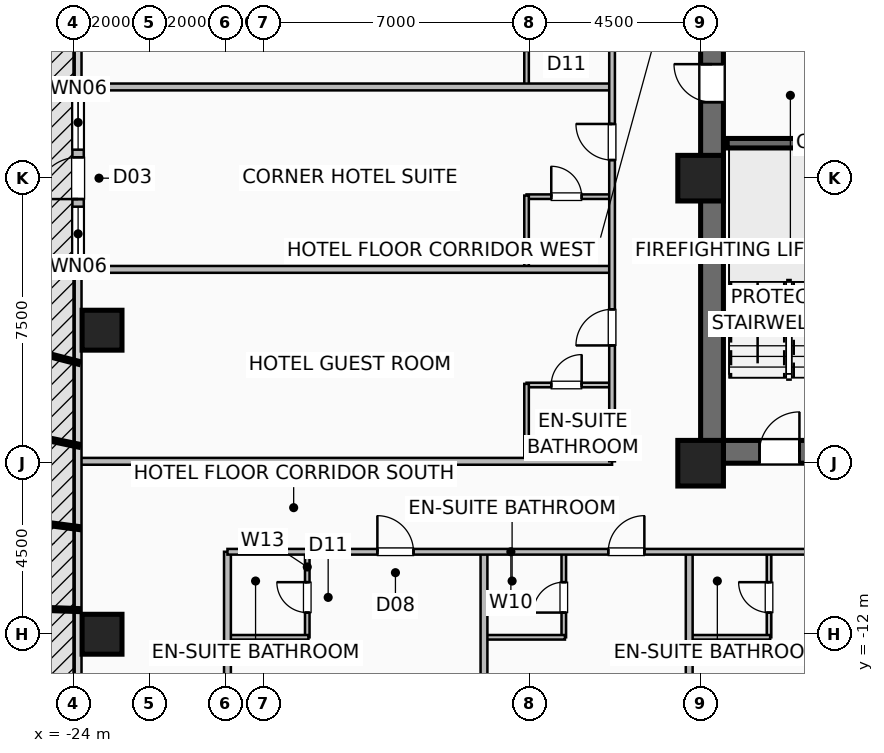
"""IFC4 building model, lengths in metres.
Left out: names, types, materials, properties, quantities, classifications, styles, units other than length and angle.
Written with IfcOpenShell. Run it as: python <this file> out.ifc"""

import sys

from ifc_helpers import new_model, si_unit, direction, frame, frame_2d, origin, origin_2d, place, context, subcontext, project, spatial, rectangle, hollow_rectangle, extrude, element, fill, save


model = new_model("IFC4")
c1 = context("Model", 3, precision=1e-05, world=origin(), true_north=direction((0.0, 1.0)))
c2 = subcontext(c1, "Body", "Model", "MODEL_VIEW")
j1 = project(units=[si_unit("LENGTHUNIT", "METRE"), si_unit("PLANEANGLEUNIT", "RADIAN")], contexts=[c1])
p1 = place(None, origin())
s1 = spatial("IfcSite", under=j1, at=p1, CompositionType="ELEMENT")
p2 = place(p1, origin())
s2 = spatial("IfcBuilding", under=s1, at=p2, CompositionType="ELEMENT")
p3 = place(p2, frame((0.0, 0.0, 27.0)))
s3 = spatial("IfcBuildingStorey", under=s2, at=p3, CompositionType="ELEMENT", Elevation=27.0)
for number, where, z_axis, x_axis in (
    (1, (-7.5, -7.5, 0.0), (0.0, 0.0, 1.0), (1.0, 0.0, 0.0)),
    (2, (-7.5, 0.0, 0.0), (0.0, 0.0, 1.0), (1.0, 0.0, 0.0)),
):
    element("IfcColumn", number, at=place(p3, frame(where, z_axis=z_axis, x_axis=x_axis)), inside=s3, PredefinedType="COLUMN", context=c2, shape_type="SweptSolid", body=[
        extrude(hollow_rectangle(XDim=1.2, YDim=1.2, WallThickness=0.055, at=origin_2d()), origin(), (0.0, 0.0, 1.0), 3.5),
    ])
p4 = place(p3, frame((-23.25, -12.0, -0.4), z_axis=(0.0, 0.0, 1.0), x_axis=(1.0, 0.0, 0.0)))
e3 = element("IfcColumn", 3, at=p4, inside=s3, PredefinedType="COLUMN", context=c2, shape_type="SweptSolid", body=[
    extrude(hollow_rectangle(XDim=1.05, YDim=1.05, WallThickness=0.05, at=origin_2d()), origin(), (0.0, 0.0, 1.0), 3.9),
])
p5 = place(p3, frame((-23.25, -4.0, 0.0), z_axis=(0.0, 0.0, 1.0), x_axis=(1.0, 0.0, 0.0)))
e4 = element("IfcColumn", 4, at=p5, inside=s3, PredefinedType="COLUMN", context=c2, shape_type="SweptSolid", body=[
    extrude(hollow_rectangle(XDim=1.05, YDim=1.05, WallThickness=0.05, at=origin_2d()), origin(), (0.0, 0.0, 1.0), 3.5),
])
p6 = place(p3, frame((-23.88, -2.4, 0.0), z_axis=(0.0, 0.0, 1.0), x_axis=(0.0, 1.0, 0.0)))
e5 = element("IfcWall", 5, at=p6, inside=s3, PredefinedType="SOLIDWALL", context=c2, shape_type="SweptSolid", body=[
    extrude(rectangle(XDim=4.8, YDim=0.3, at=frame_2d((2.4, 0.0))), origin(), (0.0, 0.0, 1.0), 3.25),
])
p7 = place(p6, frame((1.85, 0.0, 0.0)))
e6 = element("IfcOpeningElement", 6, at=p7, cuts=e5, PredefinedType="OPENING", context=c2, shape_type="SweptSolid", body=[
    extrude(rectangle(XDim=1.1, YDim=2.2, at=frame_2d((0.55, 1.1))), frame((0.0, 0.16, 0.0), z_axis=(0.0, -1.0, 0.0), x_axis=(1.0, 0.0, 0.0)), (0.0, 0.0, 1.0), 0.32),
])
p8 = place(p6, frame((0.22, 0.0, 0.85)))
e7 = element("IfcOpeningElement", 7, at=p8, cuts=e5, PredefinedType="OPENING", context=c2, shape_type="SweptSolid", body=[
    extrude(rectangle(XDim=1.43, YDim=1.8, at=frame_2d((0.715, 0.9))), frame((0.0, 0.16, 0.0), z_axis=(0.0, -1.0, 0.0), x_axis=(1.0, 0.0, 0.0)), (0.0, 0.0, 1.0), 0.32),
])
p9 = place(p6, frame((3.15, 0.0, 0.85)))
e8 = element("IfcOpeningElement", 8, at=p9, cuts=e5, PredefinedType="OPENING", context=c2, shape_type="SweptSolid", body=[
    extrude(rectangle(XDim=1.43, YDim=1.8, at=frame_2d((0.715, 0.9))), frame((0.0, 0.16, 0.0), z_axis=(0.0, -1.0, 0.0), x_axis=(1.0, 0.0, 0.0)), (0.0, 0.0, 1.0), 0.32),
])
p10 = place(p3, frame((-7.5, -7.2, 0.0), z_axis=(0.0, 0.0, 1.0), x_axis=(1.0, 0.0, 0.0)))
e9 = element("IfcWall", 9, at=p10, inside=s3, PredefinedType="SHEAR", context=c2, shape_type="SweptSolid", body=[
    extrude(rectangle(XDim=15.0, YDim=0.6, at=frame_2d((7.5, 0.0))), origin(), (0.0, 0.0, 1.0), 3.25),
])
p11 = place(p10, frame((1.55, 0.0, 0.0)))
e10 = element("IfcOpeningElement", 10, at=p11, cuts=e9, PredefinedType="OPENING", context=c2, shape_type="SweptSolid", body=[
    extrude(rectangle(XDim=1.05, YDim=2.08, at=frame_2d((0.525, 1.04))), frame((0.0, 0.31, 0.0), z_axis=(0.0, -1.0, 0.0), x_axis=(1.0, 0.0, 0.0)), (0.0, 0.0, 1.0), 0.62),
])
p12 = place(p10, frame((12.4, 0.0, 0.0)))
e11 = element("IfcOpeningElement", 11, at=p12, cuts=e9, PredefinedType="OPENING", context=c2, shape_type="SweptSolid", body=[
    extrude(rectangle(XDim=1.05, YDim=2.08, at=frame_2d((0.525, 1.04))), frame((0.0, 0.31, 0.0), z_axis=(0.0, -1.0, 0.0), x_axis=(1.0, 0.0, 0.0)), (0.0, 0.0, 1.0), 0.62),
])
p13 = place(p10, frame((4.64, 0.0, 0.0)))
e12 = element("IfcOpeningElement", 12, at=p13, cuts=e9, PredefinedType="OPENING", context=c2, shape_type="SweptSolid", body=[
    extrude(rectangle(XDim=1.1, YDim=2.2, at=frame_2d((0.55, 1.1))), frame((0.0, 0.31, 0.0), z_axis=(0.0, -1.0, 0.0), x_axis=(1.0, 0.0, 0.0)), (0.0, 0.0, 1.0), 0.62),
])
p14 = place(p10, frame((6.52, 0.0, 0.0)))
e13 = element("IfcOpeningElement", 13, at=p14, cuts=e9, PredefinedType="OPENING", context=c2, shape_type="SweptSolid", body=[
    extrude(rectangle(XDim=1.1, YDim=2.2, at=frame_2d((0.55, 1.1))), frame((0.0, 0.31, 0.0), z_axis=(0.0, -1.0, 0.0), x_axis=(1.0, 0.0, 0.0)), (0.0, 0.0, 1.0), 0.62),
])
p15 = place(p10, frame((8.4, 0.0, 0.0)))
e14 = element("IfcOpeningElement", 14, at=p15, cuts=e9, PredefinedType="OPENING", context=c2, shape_type="SweptSolid", body=[
    extrude(rectangle(XDim=1.1, YDim=2.2, at=frame_2d((0.55, 1.1))), frame((0.0, 0.31, 0.0), z_axis=(0.0, -1.0, 0.0), x_axis=(1.0, 0.0, 0.0)), (0.0, 0.0, 1.0), 0.62),
])
p16 = place(p3, frame((-7.2, -7.5, 0.0), z_axis=(0.0, 0.0, 1.0), x_axis=(0.0, 1.0, 0.0)))
e15 = element("IfcWall", 15, at=p16, inside=s3, PredefinedType="SHEAR", context=c2, shape_type="SweptSolid", body=[
    extrude(rectangle(XDim=15.0, YDim=0.6, at=frame_2d((7.5, 0.0))), origin(), (0.0, 0.0, 1.0), 3.25),
])
p17 = place(p16, frame((9.5, 0.0, 0.0)))
e16 = element("IfcOpeningElement", 16, at=p17, cuts=e15, PredefinedType="OPENING", context=c2, shape_type="SweptSolid", body=[
    extrude(rectangle(XDim=1.0, YDim=2.08, at=frame_2d((0.5, 1.04))), frame((0.0, 0.31, 0.0), z_axis=(0.0, -1.0, 0.0), x_axis=(1.0, 0.0, 0.0)), (0.0, 0.0, 1.0), 0.62),
])
p18 = place(p3, frame((-6.8, 0.92, 0.0), z_axis=(0.0, 0.0, 1.0), x_axis=(1.0, 0.0, 0.0)))
e17 = element("IfcWall", 17, at=p18, inside=s3, PredefinedType="SHEAR", context=c2, shape_type="SweptSolid", body=[
    extrude(rectangle(XDim=3.33, YDim=0.25, at=frame_2d((1.665, 0.0))), origin(), (0.0, 0.0, 1.0), 3.25),
])
p19 = place(p3, frame((-17.85, -12.08, 0.0), z_axis=(0.0, 0.0, 1.0), x_axis=(0.0, 1.0, 0.0)))
e18 = element("IfcWall", 18, at=p19, inside=s3, PredefinedType="PLUMBINGWALL", context=c2, shape_type="SweptSolid", body=[
    extrude(rectangle(XDim=2.25, YDim=0.12, at=frame_2d((1.125, 0.0))), origin(), (0.0, 0.0, 1.0), 3.25),
])
p20 = place(p19, frame((0.65, 0.0, 0.0)))
e19 = element("IfcOpeningElement", 19, at=p20, cuts=e18, PredefinedType="OPENING", context=c2, shape_type="SweptSolid", body=[
    extrude(rectangle(XDim=0.8, YDim=2.05, at=frame_2d((0.4, 1.025))), frame((0.0, 0.07, 0.0), z_axis=(0.0, -1.0, 0.0), x_axis=(1.0, 0.0, 0.0)), (0.0, 0.0, 1.0), 0.14),
])
p21 = place(p3, frame((-19.92, -12.08, 0.0), z_axis=(0.0, 0.0, 1.0), x_axis=(1.0, 0.0, 0.0)))
e20 = element("IfcWall", 20, at=p21, inside=s3, PredefinedType="PLUMBINGWALL", context=c2, shape_type="SweptSolid", body=[
    extrude(rectangle(XDim=2.1, YDim=0.12, at=frame_2d((1.05, 0.0))), origin(), (0.0, 0.0, 1.0), 3.25),
])
p22 = place(p3, frame((-11.1, -12.08, 0.0), z_axis=(0.0, 0.0, 1.0), x_axis=(0.0, 1.0, 0.0)))
e21 = element("IfcWall", 21, at=p22, inside=s3, PredefinedType="PLUMBINGWALL", context=c2, shape_type="SweptSolid", body=[
    extrude(rectangle(XDim=2.25, YDim=0.12, at=frame_2d((1.125, 0.0))), origin(), (0.0, 0.0, 1.0), 3.25),
])
p23 = place(p22, frame((0.65, 0.0, 0.0)))
e22 = element("IfcOpeningElement", 22, at=p23, cuts=e21, PredefinedType="OPENING", context=c2, shape_type="SweptSolid", body=[
    extrude(rectangle(XDim=0.8, YDim=2.05, at=frame_2d((0.4, 1.025))), frame((0.0, 0.07, 0.0), z_axis=(0.0, -1.0, 0.0), x_axis=(1.0, 0.0, 0.0)), (0.0, 0.0, 1.0), 0.14),
])
p24 = place(p3, frame((-13.17, -12.08, 0.0), z_axis=(0.0, 0.0, 1.0), x_axis=(1.0, 0.0, 0.0)))
e23 = element("IfcWall", 23, at=p24, inside=s3, PredefinedType="PLUMBINGWALL", context=c2, shape_type="SweptSolid", body=[
    extrude(rectangle(XDim=2.1, YDim=0.12, at=frame_2d((1.05, 0.0))), origin(), (0.0, 0.0, 1.0), 3.25),
])
p25 = place(p3, frame((-5.7, -12.08, 0.0), z_axis=(0.0, 0.0, 1.0), x_axis=(0.0, 1.0, 0.0)))
e24 = element("IfcWall", 24, at=p25, inside=s3, PredefinedType="PLUMBINGWALL", context=c2, shape_type="SweptSolid", body=[
    extrude(rectangle(XDim=2.25, YDim=0.12, at=frame_2d((1.125, 0.0))), origin(), (0.0, 0.0, 1.0), 3.25),
])
p26 = place(p25, frame((0.65, 0.0, 0.0)))
e25 = element("IfcOpeningElement", 25, at=p26, cuts=e24, PredefinedType="OPENING", context=c2, shape_type="SweptSolid", body=[
    extrude(rectangle(XDim=0.8, YDim=2.05, at=frame_2d((0.4, 1.025))), frame((0.0, 0.07, 0.0), z_axis=(0.0, -1.0, 0.0), x_axis=(1.0, 0.0, 0.0)), (0.0, 0.0, 1.0), 0.14),
])
p27 = place(p3, frame((-7.77, -12.08, 0.0), z_axis=(0.0, 0.0, 1.0), x_axis=(1.0, 0.0, 0.0)))
e26 = element("IfcWall", 26, at=p27, inside=s3, PredefinedType="PLUMBINGWALL", context=c2, shape_type="SweptSolid", body=[
    extrude(rectangle(XDim=2.1, YDim=0.12, at=frame_2d((1.05, 0.0))), origin(), (0.0, 0.0, 1.0), 3.25),
])
for number, where, z_axis, x_axis in (
    (27, (-19.95, -23.82, 0.0), (0.0, 0.0, 1.0), (0.0, 1.0, 0.0)),
    (28, (-13.2, -23.82, 0.0), (0.0, 0.0, 1.0), (0.0, 1.0, 0.0)),
    (29, (-7.8, -23.82, 0.0), (0.0, 0.0, 1.0), (0.0, 1.0, 0.0)),
):
    element("IfcWall", number, at=place(p3, frame(where, z_axis=z_axis, x_axis=x_axis)), inside=s3, PredefinedType="PARTITIONING", context=c2, shape_type="SweptSolid", body=[
        extrude(rectangle(XDim=13.99, YDim=0.18, at=frame_2d((6.995, 0.0))), origin(), (0.0, 0.0, 1.0), 3.25),
    ])
p28 = place(p3, frame((-19.95, -9.83, 0.0), z_axis=(0.0, 0.0, 1.0), x_axis=(1.0, 0.0, 0.0)))
e30 = element("IfcWall", 30, at=p28, inside=s3, PredefinedType="PARTITIONING", context=c2, shape_type="SweptSolid", body=[
    extrude(rectangle(XDim=39.9, YDim=0.15, at=frame_2d((19.95, 0.0))), origin(), (0.0, 0.0, 1.0), 3.25),
])
p29 = place(p28, frame((3.945, 0.0, 0.0)))
e31 = element("IfcOpeningElement", 31, at=p29, cuts=e30, PredefinedType="OPENING", context=c2, shape_type="SweptSolid", body=[
    extrude(rectangle(XDim=0.95, YDim=2.08, at=frame_2d((0.475, 1.04))), frame((0.0, 0.085, 0.0), z_axis=(0.0, -1.0, 0.0), x_axis=(1.0, 0.0, 0.0)), (0.0, 0.0, 1.0), 0.17),
])
p30 = place(p28, frame((10.02, 0.0, 0.0)))
e32 = element("IfcOpeningElement", 32, at=p30, cuts=e30, PredefinedType="OPENING", context=c2, shape_type="SweptSolid", body=[
    extrude(rectangle(XDim=0.95, YDim=2.08, at=frame_2d((0.475, 1.04))), frame((0.0, 0.085, 0.0), z_axis=(0.0, -1.0, 0.0), x_axis=(1.0, 0.0, 0.0)), (0.0, 0.0, 1.0), 0.17),
])
p31 = place(p28, frame((15.42, 0.0, 0.0)))
e33 = element("IfcOpeningElement", 33, at=p31, cuts=e30, PredefinedType="OPENING", context=c2, shape_type="SweptSolid", body=[
    extrude(rectangle(XDim=0.95, YDim=2.08, at=frame_2d((0.475, 1.04))), frame((0.0, 0.085, 0.0), z_axis=(0.0, -1.0, 0.0), x_axis=(1.0, 0.0, 0.0)), (0.0, 0.0, 1.0), 0.17),
])
p32 = place(p28, frame((20.702, 0.0, 0.0)))
e34 = element("IfcOpeningElement", 34, at=p32, cuts=e30, PredefinedType="OPENING", context=c2, shape_type="SweptSolid", body=[
    extrude(rectangle(XDim=0.95, YDim=2.08, at=frame_2d((0.475, 1.04))), frame((0.0, 0.085, 0.0), z_axis=(0.0, -1.0, 0.0), x_axis=(1.0, 0.0, 0.0)), (0.0, 0.0, 1.0), 0.17),
])
p33 = place(p28, frame((26.02, 0.0, 0.0)))
e35 = element("IfcOpeningElement", 35, at=p33, cuts=e30, PredefinedType="OPENING", context=c2, shape_type="SweptSolid", body=[
    extrude(rectangle(XDim=0.95, YDim=2.08, at=frame_2d((0.475, 1.04))), frame((0.0, 0.085, 0.0), z_axis=(0.0, -1.0, 0.0), x_axis=(1.0, 0.0, 0.0)), (0.0, 0.0, 1.0), 0.17),
])
p34 = place(p28, frame((31.37, 0.0, 0.0)))
e36 = element("IfcOpeningElement", 36, at=p34, cuts=e30, PredefinedType="OPENING", context=c2, shape_type="SweptSolid", body=[
    extrude(rectangle(XDim=0.95, YDim=2.08, at=frame_2d((0.475, 1.04))), frame((0.0, 0.085, 0.0), z_axis=(0.0, -1.0, 0.0), x_axis=(1.0, 0.0, 0.0)), (0.0, 0.0, 1.0), 0.17),
])
p35 = place(p28, frame((37.245, 0.0, 0.0)))
e37 = element("IfcOpeningElement", 37, at=p35, cuts=e30, PredefinedType="OPENING", context=c2, shape_type="SweptSolid", body=[
    extrude(rectangle(XDim=0.95, YDim=2.08, at=frame_2d((0.475, 1.04))), frame((0.0, 0.085, 0.0), z_axis=(0.0, -1.0, 0.0), x_axis=(1.0, 0.0, 0.0)), (0.0, 0.0, 1.0), 0.17),
])
p36 = place(p3, frame((-12.08, -5.442, 0.0), z_axis=(0.0, 0.0, 1.0), x_axis=(1.0, 0.0, 0.0)))
e38 = element("IfcWall", 38, at=p36, inside=s3, PredefinedType="PLUMBINGWALL", context=c2, shape_type="SweptSolid", body=[
    extrude(rectangle(XDim=2.25, YDim=0.12, at=frame_2d((1.125, 0.0))), origin(), (0.0, 0.0, 1.0), 3.25),
])
p37 = place(p36, frame((0.65, 0.0, 0.0)))
e39 = element("IfcOpeningElement", 39, at=p37, cuts=e38, PredefinedType="OPENING", context=c2, shape_type="SweptSolid", body=[
    extrude(rectangle(XDim=0.8, YDim=2.05, at=frame_2d((0.4, 1.025))), frame((0.0, 0.07, 0.0), z_axis=(0.0, -1.0, 0.0), x_axis=(1.0, 0.0, 0.0)), (0.0, 0.0, 1.0), 0.14),
])
p38 = place(p3, frame((-12.08, -7.42, 0.0), z_axis=(0.0, 0.0, 1.0), x_axis=(0.0, 1.0, 0.0)))
e40 = element("IfcWall", 40, at=p38, inside=s3, PredefinedType="PLUMBINGWALL", context=c2, shape_type="SweptSolid", body=[
    extrude(rectangle(XDim=2.008, YDim=0.12, at=frame_2d((1.004, 0.0))), origin(), (0.0, 0.0, 1.0), 3.25),
])
p39 = place(p3, frame((-12.08, -0.487, 0.0), z_axis=(0.0, 0.0, 1.0), x_axis=(1.0, 0.0, 0.0)))
e41 = element("IfcWall", 41, at=p39, inside=s3, PredefinedType="PLUMBINGWALL", context=c2, shape_type="SweptSolid", body=[
    extrude(rectangle(XDim=2.25, YDim=0.12, at=frame_2d((1.125, 0.0))), origin(), (0.0, 0.0, 1.0), 3.25),
])
p40 = place(p39, frame((0.65, 0.0, 0.0)))
e42 = element("IfcOpeningElement", 42, at=p40, cuts=e41, PredefinedType="OPENING", context=c2, shape_type="SweptSolid", body=[
    extrude(rectangle(XDim=0.8, YDim=2.05, at=frame_2d((0.4, 1.025))), frame((0.0, 0.07, 0.0), z_axis=(0.0, -1.0, 0.0), x_axis=(1.0, 0.0, 0.0)), (0.0, 0.0, 1.0), 0.14),
])
p41 = place(p3, frame((-12.08, -2.37, 0.0), z_axis=(0.0, 0.0, 1.0), x_axis=(0.0, 1.0, 0.0)))
e43 = element("IfcWall", 43, at=p41, inside=s3, PredefinedType="PLUMBINGWALL", context=c2, shape_type="SweptSolid", body=[
    extrude(rectangle(XDim=1.913, YDim=0.12, at=frame_2d((0.957, 0.0))), origin(), (0.0, 0.0, 1.0), 3.25),
])
p42 = place(p3, frame((-12.08, 2.43, 0.0), z_axis=(0.0, 0.0, 1.0), x_axis=(0.0, 1.0, 0.0)))
e44 = element("IfcWall", 44, at=p42, inside=s3, PredefinedType="PLUMBINGWALL", context=c2, shape_type="SweptSolid", body=[
    extrude(rectangle(XDim=2.008, YDim=0.12, at=frame_2d((1.004, 0.0))), origin(), (0.0, 0.0, 1.0), 3.25),
])
for number, where, z_axis, x_axis in (
    (45, (-23.82, -7.45, 0.0), (0.0, 0.0, 1.0), (1.0, 0.0, 0.0)),
    (46, (-23.82, -2.4, 0.0), (0.0, 0.0, 1.0), (1.0, 0.0, 0.0)),
    (47, (-23.82, 2.4, 0.0), (0.0, 0.0, 1.0), (1.0, 0.0, 0.0)),
):
    element("IfcWall", number, at=place(p3, frame(where, z_axis=z_axis, x_axis=x_axis)), inside=s3, PredefinedType="PARTITIONING", context=c2, shape_type="SweptSolid", body=[
        extrude(rectangle(XDim=13.99, YDim=0.18, at=frame_2d((6.995, 0.0))), origin(), (0.0, 0.0, 1.0), 3.25),
    ])
p43 = place(p3, frame((-9.83, -7.45, 0.0), z_axis=(0.0, 0.0, 1.0), x_axis=(0.0, 1.0, 0.0)))
e48 = element("IfcWall", 48, at=p43, inside=s3, PredefinedType="PARTITIONING", context=c2, shape_type="SweptSolid", body=[
    extrude(rectangle(XDim=14.9, YDim=0.15, at=frame_2d((7.45, 0.0))), origin(), (0.0, 0.0, 1.0), 3.25),
])
p44 = place(p43, frame((3.049, 0.0, 0.0)))
e49 = element("IfcOpeningElement", 49, at=p44, cuts=e48, PredefinedType="OPENING", context=c2, shape_type="SweptSolid", body=[
    extrude(rectangle(XDim=0.95, YDim=2.08, at=frame_2d((0.475, 1.04))), frame((0.0, 0.085, 0.0), z_axis=(0.0, -1.0, 0.0), x_axis=(1.0, 0.0, 0.0)), (0.0, 0.0, 1.0), 0.17),
])
p45 = place(p43, frame((7.927, 0.0, 0.0)))
e50 = element("IfcOpeningElement", 50, at=p45, cuts=e48, PredefinedType="OPENING", context=c2, shape_type="SweptSolid", body=[
    extrude(rectangle(XDim=0.95, YDim=2.08, at=frame_2d((0.475, 1.04))), frame((0.0, 0.085, 0.0), z_axis=(0.0, -1.0, 0.0), x_axis=(1.0, 0.0, 0.0)), (0.0, 0.0, 1.0), 0.17),
])
p46 = place(p43, frame((12.899, 0.0, 0.0)))
e51 = element("IfcOpeningElement", 51, at=p46, cuts=e48, PredefinedType="OPENING", context=c2, shape_type="SweptSolid", body=[
    extrude(rectangle(XDim=0.95, YDim=2.08, at=frame_2d((0.475, 1.04))), frame((0.0, 0.085, 0.0), z_axis=(0.0, -1.0, 0.0), x_axis=(1.0, 0.0, 0.0)), (0.0, 0.0, 1.0), 0.17),
])
p47 = place(p7, origin())
e52 = element("IfcDoor", 52, at=p47, inside=s3, OperationType="SINGLE_SWING_LEFT", PredefinedType="DOOR", context=c2, shape_type="SweptSolid", body=[
    extrude(rectangle(XDim=1.1, YDim=2.2, at=frame_2d((0.55, 1.1))), frame((0.0, 0.025, 0.0), z_axis=(0.0, -1.0, 0.0), x_axis=(1.0, 0.0, 0.0)), (0.0, 0.0, 1.0), 0.05),
])
fill(e6, e52)
p48 = place(p8, origin())
e53 = element("IfcWindow", 53, at=p48, inside=s3, PartitioningType="SINGLE_PANEL", PredefinedType="WINDOW", context=c2, shape_type="SweptSolid", body=[
    extrude(rectangle(XDim=1.43, YDim=1.8, at=frame_2d((0.715, 0.9))), frame((0.0, 0.03, 0.0), z_axis=(0.0, -1.0, 0.0), x_axis=(1.0, 0.0, 0.0)), (0.0, 0.0, 1.0), 0.06),
])
fill(e7, e53)
p49 = place(p9, origin())
e54 = element("IfcWindow", 54, at=p49, inside=s3, PartitioningType="SINGLE_PANEL", PredefinedType="WINDOW", context=c2, shape_type="SweptSolid", body=[
    extrude(rectangle(XDim=1.43, YDim=1.8, at=frame_2d((0.715, 0.9))), frame((0.0, 0.03, 0.0), z_axis=(0.0, -1.0, 0.0), x_axis=(1.0, 0.0, 0.0)), (0.0, 0.0, 1.0), 0.06),
])
fill(e8, e54)
p50 = place(p11, origin())
e55 = element("IfcDoor", 55, at=p50, inside=s3, OperationType="SINGLE_SWING_RIGHT", PredefinedType="DOOR", context=c2, shape_type="SweptSolid", body=[
    extrude(rectangle(XDim=1.05, YDim=2.08, at=frame_2d((0.525, 1.04))), frame((0.0, 0.025, 0.0), z_axis=(0.0, -1.0, 0.0), x_axis=(1.0, 0.0, 0.0)), (0.0, 0.0, 1.0), 0.05),
])
fill(e10, e55)
p51 = place(p17, origin())
e56 = element("IfcDoor", 56, at=p51, inside=s3, OperationType="SINGLE_SWING_RIGHT", PredefinedType="DOOR", context=c2, shape_type="SweptSolid", body=[
    extrude(rectangle(XDim=1.0, YDim=2.08, at=frame_2d((0.5, 1.04))), frame((0.0, 0.025, 0.0), z_axis=(0.0, -1.0, 0.0), x_axis=(1.0, 0.0, 0.0)), (0.0, 0.0, 1.0), 0.05),
])
fill(e16, e56)
p52 = place(p20, origin())
e57 = element("IfcDoor", 57, at=p52, inside=s3, OperationType="SINGLE_SWING_RIGHT", PredefinedType="DOOR", context=c2, shape_type="SweptSolid", body=[
    extrude(rectangle(XDim=0.8, YDim=2.05, at=frame_2d((0.4, 1.025))), frame((0.0, 0.025, 0.0), z_axis=(0.0, -1.0, 0.0), x_axis=(1.0, 0.0, 0.0)), (0.0, 0.0, 1.0), 0.05),
])
fill(e19, e57)
p53 = place(p23, origin())
e58 = element("IfcDoor", 58, at=p53, inside=s3, OperationType="SINGLE_SWING_LEFT", PredefinedType="DOOR", context=c2, shape_type="SweptSolid", body=[
    extrude(rectangle(XDim=0.8, YDim=2.05, at=frame_2d((0.4, 1.025))), frame((0.0, 0.025, 0.0), z_axis=(0.0, -1.0, 0.0), x_axis=(1.0, 0.0, 0.0)), (0.0, 0.0, 1.0), 0.05),
])
fill(e22, e58)
p54 = place(p26, origin())
e59 = element("IfcDoor", 59, at=p54, inside=s3, OperationType="SINGLE_SWING_RIGHT", PredefinedType="DOOR", context=c2, shape_type="SweptSolid", body=[
    extrude(rectangle(XDim=0.8, YDim=2.05, at=frame_2d((0.4, 1.025))), frame((0.0, 0.025, 0.0), z_axis=(0.0, -1.0, 0.0), x_axis=(1.0, 0.0, 0.0)), (0.0, 0.0, 1.0), 0.05),
])
fill(e25, e59)
p55 = place(p29, origin())
e60 = element("IfcDoor", 60, at=p55, inside=s3, OperationType="SINGLE_SWING_LEFT", PredefinedType="DOOR", context=c2, shape_type="SweptSolid", body=[
    extrude(rectangle(XDim=0.95, YDim=2.08, at=frame_2d((0.475, 1.04))), frame((0.0, 0.025, 0.0), z_axis=(0.0, -1.0, 0.0), x_axis=(1.0, 0.0, 0.0)), (0.0, 0.0, 1.0), 0.05),
])
fill(e31, e60)
p56 = place(p30, origin())
e61 = element("IfcDoor", 61, at=p56, inside=s3, OperationType="SINGLE_SWING_RIGHT", PredefinedType="DOOR", context=c2, shape_type="SweptSolid", body=[
    extrude(rectangle(XDim=0.95, YDim=2.08, at=frame_2d((0.475, 1.04))), frame((0.0, 0.025, 0.0), z_axis=(0.0, -1.0, 0.0), x_axis=(1.0, 0.0, 0.0)), (0.0, 0.0, 1.0), 0.05),
])
fill(e32, e61)
p57 = place(p37, origin())
e62 = element("IfcDoor", 62, at=p57, inside=s3, OperationType="SINGLE_SWING_RIGHT", PredefinedType="DOOR", context=c2, shape_type="SweptSolid", body=[
    extrude(rectangle(XDim=0.8, YDim=2.05, at=frame_2d((0.4, 1.025))), frame((0.0, 0.025, 0.0), z_axis=(0.0, -1.0, 0.0), x_axis=(1.0, 0.0, 0.0)), (0.0, 0.0, 1.0), 0.05),
])
fill(e39, e62)
p58 = place(p40, origin())
e63 = element("IfcDoor", 63, at=p58, inside=s3, OperationType="SINGLE_SWING_LEFT", PredefinedType="DOOR", context=c2, shape_type="SweptSolid", body=[
    extrude(rectangle(XDim=0.8, YDim=2.05, at=frame_2d((0.4, 1.025))), frame((0.0, 0.025, 0.0), z_axis=(0.0, -1.0, 0.0), x_axis=(1.0, 0.0, 0.0)), (0.0, 0.0, 1.0), 0.05),
])
fill(e42, e63)
p59 = place(p44, origin())
e64 = element("IfcDoor", 64, at=p59, inside=s3, OperationType="SINGLE_SWING_LEFT", PredefinedType="DOOR", context=c2, shape_type="SweptSolid", body=[
    extrude(rectangle(XDim=0.95, YDim=2.08, at=frame_2d((0.475, 1.04))), frame((0.0, 0.025, 0.0), z_axis=(0.0, -1.0, 0.0), x_axis=(1.0, 0.0, 0.0)), (0.0, 0.0, 1.0), 0.05),
])
fill(e49, e64)
p60 = place(p45, origin())
e65 = element("IfcDoor", 65, at=p60, inside=s3, OperationType="SINGLE_SWING_RIGHT", PredefinedType="DOOR", context=c2, shape_type="SweptSolid", body=[
    extrude(rectangle(XDim=0.95, YDim=2.08, at=frame_2d((0.475, 1.04))), frame((0.0, 0.025, 0.0), z_axis=(0.0, -1.0, 0.0), x_axis=(1.0, 0.0, 0.0)), (0.0, 0.0, 1.0), 0.05),
])
fill(e50, e65)
save(model, sys.argv[1])
